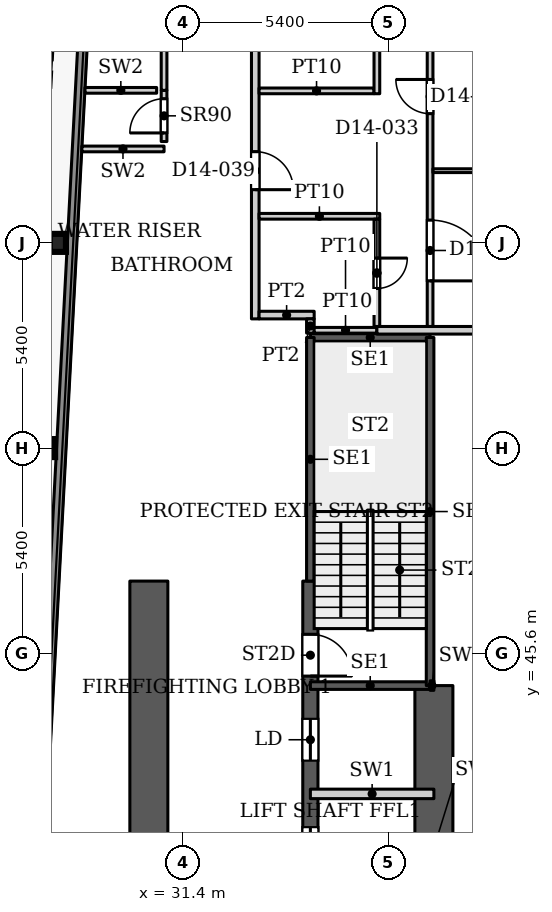
"""IFC4 building model, lengths in metres.
Left out: names, types, materials, properties, quantities, classifications, styles, units other than length and angle.
Written with IfcOpenShell. Run it as: python <this file> out.ifc"""

import sys

from ifc_helpers import new_model, si_unit, direction, frame, frame_2d, origin, origin_2d, place, context, subcontext, project, spatial, rectangle, i_section, extrude, source, transform, mapped, element, fill, save


model = new_model("IFC4")
c1 = context("Model", 3, precision=1e-05, world=origin(), true_north=direction((0.0, 1.0)))
c2 = subcontext(c1, "Body", "Model", "MODEL_VIEW")
j1 = project(units=[si_unit("LENGTHUNIT", "METRE"), si_unit("PLANEANGLEUNIT", "RADIAN")], contexts=[c1])
p1 = place(None, origin())
s1 = spatial("IfcSite", under=j1, at=p1, CompositionType="ELEMENT")
p2 = place(p1, origin())
s2 = spatial("IfcBuilding", under=s1, at=p2, CompositionType="ELEMENT")
p3 = place(p2, frame((0.0, 0.0, 61.7)))
s3 = spatial("IfcBuildingStorey", under=s2, at=p3, CompositionType="ELEMENT", Elevation=61.7)
for number, where, z_axis, x_axis in (
    (1, (27.822, 51.0, 0.0), (0.0, 0.0, 1.0), (1.0, 0.0, 0.0)),
    (2, (28.106, 56.4, 0.0), (0.0, 0.0, 1.0), (1.0, 0.0, 0.0)),
):
    element("IfcColumn", number, at=place(p3, frame(where, z_axis=z_axis, x_axis=x_axis)), inside=s3, PredefinedType="COLUMN", context=c2, shape_type="SweptSolid", body=[
        extrude(i_section(OverallWidth=0.424, OverallDepth=0.474, WebThickness=0.048, FlangeThickness=0.077, FilletRadius=0.014, at=origin_2d()), origin(), (0.0, 0.0, 1.0), 3.9),
    ])
p4 = place(p3, frame((34.75, 29.05, 0.0), z_axis=(0.0, 0.0, 1.0), x_axis=(0.0, 1.0, 0.0)))
e3 = element("IfcWall", 3, at=p4, inside=s3, PredefinedType="SHEAR", context=c2, shape_type="SweptSolid", body=[
    extrude(rectangle(XDim=18.45, YDim=0.4, at=frame_2d((9.225, 0.0))), origin(), (0.0, 0.0, 1.0), 3.9),
])
p5 = place(p4, frame((8.025, 0.0, 0.0)))
e4 = element("IfcOpeningElement", 4, at=p5, cuts=e3, PredefinedType="OPENING", context=c2, shape_type="SweptSolid", body=[
    extrude(rectangle(XDim=1.1, YDim=2.2, at=frame_2d((0.55, 1.1))), frame((0.0, 0.21, 0.0), z_axis=(0.0, -1.0, 0.0), x_axis=(1.0, 0.0, 0.0)), (0.0, 0.0, 1.0), 0.42),
])
p6 = place(p4, frame((10.875, 0.0, 0.0)))
e5 = element("IfcOpeningElement", 5, at=p6, cuts=e3, PredefinedType="OPENING", context=c2, shape_type="SweptSolid", body=[
    extrude(rectangle(XDim=1.1, YDim=2.2, at=frame_2d((0.55, 1.1))), frame((0.0, 0.21, 0.0), z_axis=(0.0, -1.0, 0.0), x_axis=(1.0, 0.0, 0.0)), (0.0, 0.0, 1.0), 0.42),
])
p7 = place(p4, frame((13.725, 0.0, 0.0)))
e6 = element("IfcOpeningElement", 6, at=p7, cuts=e3, PredefinedType="OPENING", context=c2, shape_type="SweptSolid", body=[
    extrude(rectangle(XDim=1.1, YDim=2.2, at=frame_2d((0.55, 1.1))), frame((0.0, 0.21, 0.0), z_axis=(0.0, -1.0, 0.0), x_axis=(1.0, 0.0, 0.0)), (0.0, 0.0, 1.0), 0.42),
])
p8 = place(p4, frame((15.95, 0.0, 0.0)))
e7 = element("IfcOpeningElement", 7, at=p8, cuts=e3, PredefinedType="OPENING", context=c2, shape_type="SweptSolid", body=[
    extrude(rectangle(XDim=1.1, YDim=2.2, at=frame_2d((0.55, 1.1))), frame((0.0, 0.21, 0.0), z_axis=(0.0, -1.0, 0.0), x_axis=(1.0, 0.0, 0.0)), (0.0, 0.0, 1.0), 0.42),
])
p9 = place(p3, frame((38.0, 36.2, 0.0), z_axis=(0.0, 0.0, 1.0), x_axis=(0.0, 1.0, 0.0)))
e8 = element("IfcWall", 8, at=p9, inside=s3, PredefinedType="SHEAR", context=c2, shape_type="SweptSolid", body=[
    extrude(rectangle(XDim=8.55, YDim=1.0, at=frame_2d((4.275, 0.0))), origin(), (0.0, 0.0, 1.0), 3.9),
])
p10 = place(p3, frame((30.5, 29.05, 0.0), z_axis=(0.0, 0.0, 1.0), x_axis=(0.0, 1.0, 0.0)))
e9 = element("IfcWall", 9, at=p10, inside=s3, PredefinedType="SHEAR", context=c2, shape_type="SweptSolid", body=[
    extrude(rectangle(XDim=18.45, YDim=1.0, at=frame_2d((9.225, 0.0))), origin(), (0.0, 0.0, 1.0), 3.9),
])
p11 = place(p10, frame((1.5, 0.0, 0.0)))
e10 = element("IfcOpeningElement", 10, at=p11, cuts=e9, PredefinedType="OPENING", context=c2, shape_type="SweptSolid", body=[
    extrude(rectangle(XDim=0.9, YDim=2.2, at=frame_2d((0.45, 1.1))), frame((0.0, 0.51, 0.0), z_axis=(0.0, -1.0, 0.0), x_axis=(1.0, 0.0, 0.0)), (0.0, 0.0, 1.0), 1.02),
])
p12 = place(p10, frame((6.03, 0.0, 0.0)))
e11 = element("IfcOpeningElement", 11, at=p12, cuts=e9, PredefinedType="OPENING", context=c2, shape_type="SweptSolid", body=[
    extrude(rectangle(XDim=0.9, YDim=2.2, at=frame_2d((0.45, 1.1))), frame((0.0, 0.51, 0.0), z_axis=(0.0, -1.0, 0.0), x_axis=(1.0, 0.0, 0.0)), (0.0, 0.0, 1.0), 1.02),
])
p13 = place(p10, frame((9.7, 0.0, 0.0)))
e12 = element("IfcOpeningElement", 12, at=p13, cuts=e9, PredefinedType="OPENING", context=c2, shape_type="SweptSolid", body=[
    extrude(rectangle(XDim=0.9, YDim=2.2, at=frame_2d((0.45, 1.1))), frame((0.0, 0.51, 0.0), z_axis=(0.0, -1.0, 0.0), x_axis=(1.0, 0.0, 0.0)), (0.0, 0.0, 1.0), 1.02),
])
p14 = place(p3, frame((27.195, 31.969, 0.0), z_axis=(0.0, 0.0, 1.0), x_axis=(0.052554995867, 0.998618031286, 0.0)))
e13 = element("IfcWall", 13, at=p14, inside=s3, PredefinedType="SOLIDWALL", context=c2, shape_type="SweptSolid", body=[
    extrude(rectangle(XDim=66.787, YDim=0.25, at=frame_2d((33.394, 0.0))), origin(), (0.0, 0.0, 1.0), 3.75),
])
for number, where, z_axis, x_axis in (
    (14, (34.75, 44.75, 0.0), (0.0, 0.0, 1.0), (1.0, 0.0, 0.0)),
    (15, (34.75, 53.91, 0.0), (0.0, 0.0, 1.0), (1.0, 0.0, 0.0)),
):
    element("IfcWall", number, at=place(p3, frame(where, z_axis=z_axis, x_axis=x_axis)), inside=s3, PredefinedType="SHEAR", context=c2, shape_type="SweptSolid", body=[
        extrude(rectangle(XDim=3.15, YDim=0.2, at=frame_2d((1.575, 0.0))), origin(), (0.0, 0.0, 1.0), 3.9),
    ])
p15 = place(p3, frame((34.75, 47.5, 0.0), z_axis=(0.0, 0.0, 1.0), x_axis=(0.0, 1.0, 0.0)))
e16 = element("IfcWall", 16, at=p15, inside=s3, PredefinedType="SHEAR", context=c2, shape_type="SweptSolid", body=[
    extrude(rectangle(XDim=6.41, YDim=0.2, at=frame_2d((3.205, 0.0))), origin(), (0.0, 0.0, 1.0), 3.9),
])
p16 = place(p3, frame((37.9, 44.75, 0.0), z_axis=(0.0, 0.0, 1.0), x_axis=(0.0, 1.0, 0.0)))
e17 = element("IfcWall", 17, at=p16, inside=s3, PredefinedType="SHEAR", context=c2, shape_type="SweptSolid", body=[
    extrude(rectangle(XDim=9.16, YDim=0.2, at=frame_2d((4.58, 0.0))), origin(), (0.0, 0.0, 1.0), 3.9),
])
p17 = place(p3, frame((34.75, 41.9, 0.0), z_axis=(0.0, 0.0, 1.0), x_axis=(1.0, 0.0, 0.0)))
e18 = element("IfcWall", 18, at=p17, inside=s3, PredefinedType="PARTITIONING", context=c2, shape_type="SweptSolid", body=[
    extrude(rectangle(XDim=3.25, YDim=0.25, at=frame_2d((1.625, 0.0))), origin(), (0.0, 0.0, 1.0), 3.9),
])
p18 = place(p3, frame((37.9, 44.75, 0.0), z_axis=(0.0, 0.0, 1.0), x_axis=(1.0, 0.0, 0.0)))
e19 = element("IfcWall", 19, at=p18, inside=s3, PredefinedType="PARTITIONING", context=c2, shape_type="SweptSolid", body=[
    extrude(rectangle(XDim=0.1, YDim=0.25, at=frame_2d((0.05, 0.0))), origin(), (0.0, 0.0, 1.0), 3.9),
])
p19 = place(p3, frame((28.738, 58.872, 0.0), z_axis=(0.0, 0.0, 1.0), x_axis=(1.0, 0.0, 0.0)))
e20 = element("IfcWall", 20, at=p19, inside=s3, PredefinedType="PARTITIONING", context=c2, shape_type="SweptSolid", body=[
    extrude(rectangle(XDim=2.162, YDim=0.15, at=frame_2d((1.081, 0.0))), origin(), (0.0, 0.0, 1.0), 3.9),
])
p20 = place(p3, frame((30.9, 59.067, 0.0), z_axis=(0.0, 0.0, 1.0), x_axis=(0.0, 1.0, 0.0)))
e21 = element("IfcWall", 21, at=p20, inside=s3, PredefinedType="PARTITIONING", context=c2, shape_type="SweptSolid", body=[
    extrude(rectangle(XDim=1.347, YDim=0.15, at=frame_2d((0.674, 0.0))), origin(), (0.0, 0.0, 1.0), 3.9),
])
p21 = place(p20, frame((0.226, 0.0, 0.0)))
e22 = element("IfcOpeningElement", 22, at=p21, cuts=e21, PredefinedType="OPENING", context=c2, shape_type="SweptSolid", body=[
    extrude(rectangle(XDim=0.9, YDim=2.2, at=frame_2d((0.45, 1.1))), frame((0.0, 0.085, 0.0), z_axis=(0.0, -1.0, 0.0), x_axis=(1.0, 0.0, 0.0)), (0.0, 0.0, 1.0), 0.17),
])
p22 = place(p3, frame((28.82, 60.414, 0.0), z_axis=(0.0, 0.0, 1.0), x_axis=(1.0, 0.0, 0.0)))
e23 = element("IfcWall", 23, at=p22, inside=s3, PredefinedType="PARTITIONING", context=c2, shape_type="SweptSolid", body=[
    extrude(rectangle(XDim=1.885, YDim=0.15, at=frame_2d((0.942, 0.0))), origin(), (0.0, 0.0, 1.0), 3.9),
])
p23 = place(p3, frame((30.9, 60.414, 0.0), z_axis=(0.0, 0.0, 1.0), x_axis=(0.0, 1.0, 0.0)))
e24 = element("IfcWall", 24, at=p23, inside=s3, PredefinedType="PARTITIONING", context=c2, shape_type="SweptSolid", body=[
    extrude(rectangle(XDim=4.386, YDim=0.15, at=frame_2d((2.193, 0.0))), origin(), (0.0, 0.0, 1.0), 3.072),
])
p24 = place(p23, frame((1.743, 0.0, 0.0)))
e25 = element("IfcOpeningElement", 25, at=p24, cuts=e24, PredefinedType="OPENING", context=c2, shape_type="SweptSolid", body=[
    extrude(rectangle(XDim=0.9, YDim=2.2, at=frame_2d((0.45, 1.1))), frame((0.0, 0.085, 0.0), z_axis=(0.0, -1.0, 0.0), x_axis=(1.0, 0.0, 0.0)), (0.0, 0.0, 1.0), 0.17),
])
p25 = place(p3, frame((33.3, 54.4, 0.0), z_axis=(0.0, 0.0, 1.0), x_axis=(0.0, 1.0, 0.0)))
e26 = element("IfcWall", 26, at=p25, inside=s3, PredefinedType="PARTITIONING", context=c2, shape_type="SweptSolid", body=[
    extrude(rectangle(XDim=24.95, YDim=0.2, at=frame_2d((12.475, 0.0))), origin(), (0.0, 0.0, 1.0), 3.6),
])
p26 = place(p25, frame((3.4, 0.0, 0.0)))
e27 = element("IfcOpeningElement", 27, at=p26, cuts=e26, PredefinedType="OPENING", context=c2, shape_type="SweptSolid", body=[
    extrude(rectangle(XDim=1.0, YDim=2.1, at=frame_2d((0.5, 1.05))), frame((0.0, 0.11, 0.0), z_axis=(0.0, -1.0, 0.0), x_axis=(1.0, 0.0, 0.0)), (0.0, 0.0, 1.0), 0.22),
])
p27 = place(p3, frame((33.4, 54.5, 0.0), z_axis=(0.0, 0.0, 1.0), x_axis=(1.0, 0.0, 0.0)))
e28 = element("IfcWall", 28, at=p27, inside=s3, PredefinedType="PARTITIONING", context=c2, shape_type="SweptSolid", body=[
    extrude(rectangle(XDim=1.45, YDim=0.2, at=frame_2d((0.725, 0.0))), origin(), (0.0, 0.0, 1.0), 3.6),
])
p28 = place(p3, frame((33.4, 57.1, 0.0), z_axis=(0.0, 0.0, 1.0), x_axis=(1.0, 0.0, 0.0)))
e29 = element("IfcWall", 29, at=p28, inside=s3, PredefinedType="PARTITIONING", context=c2, shape_type="SweptSolid", body=[
    extrude(rectangle(XDim=3.175, YDim=0.15, at=frame_2d((1.587, 0.0))), origin(), (0.0, 0.0, 1.0), 3.6),
])
p29 = place(p3, frame((33.4, 60.4, 0.0), z_axis=(0.0, 0.0, 1.0), x_axis=(1.0, 0.0, 0.0)))
e30 = element("IfcWall", 30, at=p29, inside=s3, PredefinedType="PARTITIONING", context=c2, shape_type="SweptSolid", body=[
    extrude(rectangle(XDim=3.025, YDim=0.15, at=frame_2d((1.513, 0.0))), origin(), (0.0, 0.0, 1.0), 3.6),
])
p30 = place(p3, frame((34.75, 54.025, 0.0), z_axis=(0.0, 0.0, 1.0), x_axis=(0.0, 1.0, 0.0)))
e31 = element("IfcWall", 31, at=p30, inside=s3, PredefinedType="PARTITIONING", context=c2, shape_type="SweptSolid", body=[
    extrude(rectangle(XDim=0.375, YDim=0.2, at=frame_2d((0.188, 0.0))), origin(), (0.0, 0.0, 1.0), 3.6),
])
p31 = place(p3, frame((34.85, 54.1, 0.0), z_axis=(0.0, 0.0, 1.0), x_axis=(1.0, 0.0, 0.0)))
e32 = element("IfcWall", 32, at=p31, inside=s3, PredefinedType="PARTITIONING", context=c2, shape_type="SweptSolid", body=[
    extrude(rectangle(XDim=1.65, YDim=0.15, at=frame_2d((0.825, 0.0))), origin(), (0.0, 0.0, 1.0), 3.6),
])
p32 = place(p3, frame((36.5, 54.1, 0.0), z_axis=(0.0, 0.0, 1.0), x_axis=(1.0, 0.0, 0.0)))
e33 = element("IfcWall", 33, at=p32, inside=s3, PredefinedType="PARTITIONING", context=c2, shape_type="SweptSolid", body=[
    extrude(rectangle(XDim=9.4, YDim=0.2, at=frame_2d((4.7, 0.0))), origin(), (0.0, 0.0, 1.0), 3.6),
])
p33 = place(p3, frame((36.5, 54.2, 0.0), z_axis=(0.0, 0.0, 1.0), x_axis=(0.0, 1.0, 0.0)))
e34 = element("IfcWall", 34, at=p33, inside=s3, PredefinedType="PARTITIONING", context=c2, shape_type="SweptSolid", body=[
    extrude(rectangle(XDim=2.825, YDim=0.15, at=frame_2d((1.413, 0.0))), origin(), (0.0, 0.0, 1.0), 3.6),
])
p34 = place(p33, frame((1.0, 0.0, 0.0)))
e35 = element("IfcOpeningElement", 35, at=p34, cuts=e34, PredefinedType="OPENING", context=c2, shape_type="SweptSolid", body=[
    extrude(rectangle(XDim=0.8, YDim=2.1, at=frame_2d((0.4, 1.05))), frame((0.0, 0.085, 0.0), z_axis=(0.0, -1.0, 0.0), x_axis=(1.0, 0.0, 0.0)), (0.0, 0.0, 1.0), 0.17),
])
p35 = place(p3, frame((36.5, 60.325, 0.0), z_axis=(0.0, 0.0, 1.0), x_axis=(0.0, 1.0, 0.0)))
e36 = element("IfcWall", 36, at=p35, inside=s3, PredefinedType="PARTITIONING", context=c2, shape_type="SweptSolid", body=[
    extrude(rectangle(XDim=18.925, YDim=0.15, at=frame_2d((9.462, 0.0))), origin(), (0.0, 0.0, 1.0), 3.6),
])
p36 = place(p35, frame((8.075, 0.0, 0.0)))
e37 = element("IfcOpeningElement", 37, at=p36, cuts=e36, PredefinedType="OPENING", context=c2, shape_type="SweptSolid", body=[
    extrude(rectangle(XDim=0.8, YDim=2.1, at=frame_2d((0.4, 1.05))), frame((0.0, 0.085, 0.0), z_axis=(0.0, -1.0, 0.0), x_axis=(1.0, 0.0, 0.0)), (0.0, 0.0, 1.0), 0.17),
])
p37 = place(p35, frame((15.425, 0.0, 0.0)))
e38 = element("IfcOpeningElement", 38, at=p37, cuts=e36, PredefinedType="OPENING", context=c2, shape_type="SweptSolid", body=[
    extrude(rectangle(XDim=0.9, YDim=2.1, at=frame_2d((0.45, 1.05))), frame((0.0, 0.085, 0.0), z_axis=(0.0, -1.0, 0.0), x_axis=(1.0, 0.0, 0.0)), (0.0, 0.0, 1.0), 0.17),
])
p38 = place(p35, frame((12.275, 0.0, 0.0)))
e39 = element("IfcOpeningElement", 39, at=p38, cuts=e36, PredefinedType="OPENING", context=c2, shape_type="SweptSolid", body=[
    extrude(rectangle(XDim=0.8, YDim=2.1, at=frame_2d((0.4, 1.05))), frame((0.0, 0.085, 0.0), z_axis=(0.0, -1.0, 0.0), x_axis=(1.0, 0.0, 0.0)), (0.0, 0.0, 1.0), 0.17),
])
p39 = place(p35, frame((1.675, 0.0, 0.0)))
e40 = element("IfcOpeningElement", 40, at=p39, cuts=e36, PredefinedType="OPENING", context=c2, shape_type="SweptSolid", body=[
    extrude(rectangle(XDim=0.8, YDim=2.1, at=frame_2d((0.4, 1.05))), frame((0.0, 0.085, 0.0), z_axis=(0.0, -1.0, 0.0), x_axis=(1.0, 0.0, 0.0)), (0.0, 0.0, 1.0), 0.17),
])
p40 = place(p3, frame((37.9, 54.2, 0.0), z_axis=(0.0, 0.0, 1.0), x_axis=(0.0, 1.0, 0.0)))
e41 = element("IfcWall", 41, at=p40, inside=s3, PredefinedType="PARTITIONING", context=c2, shape_type="SweptSolid", body=[
    extrude(rectangle(XDim=25.05, YDim=0.15, at=frame_2d((12.525, 0.0))), origin(), (0.0, 0.0, 1.0), 3.6),
])
p41 = place(p40, frame((5.6, 0.0, 0.0)))
e42 = element("IfcOpeningElement", 42, at=p41, cuts=e41, PredefinedType="OPENING", context=c2, shape_type="SweptSolid", body=[
    extrude(rectangle(XDim=0.9, YDim=2.1, at=frame_2d((0.45, 1.05))), frame((0.0, 0.085, 0.0), z_axis=(0.0, -1.0, 0.0), x_axis=(1.0, 0.0, 0.0)), (0.0, 0.0, 1.0), 0.17),
])
p42 = place(p40, frame((14.9, 0.0, 0.0)))
e43 = element("IfcOpeningElement", 43, at=p42, cuts=e41, PredefinedType="OPENING", context=c2, shape_type="SweptSolid", body=[
    extrude(rectangle(XDim=0.9, YDim=2.1, at=frame_2d((0.45, 1.05))), frame((0.0, 0.085, 0.0), z_axis=(0.0, -1.0, 0.0), x_axis=(1.0, 0.0, 0.0)), (0.0, 0.0, 1.0), 0.17),
])
p43 = place(p40, frame((18.65, 0.0, 0.0)))
e44 = element("IfcOpeningElement", 44, at=p43, cuts=e41, PredefinedType="OPENING", context=c2, shape_type="SweptSolid", body=[
    extrude(rectangle(XDim=0.9, YDim=2.1, at=frame_2d((0.45, 1.05))), frame((0.0, 0.085, 0.0), z_axis=(0.0, -1.0, 0.0), x_axis=(1.0, 0.0, 0.0)), (0.0, 0.0, 1.0), 0.17),
])
p44 = place(p40, frame((22.5, 0.0, 0.0)))
e45 = element("IfcOpeningElement", 45, at=p44, cuts=e41, PredefinedType="OPENING", context=c2, shape_type="SweptSolid", body=[
    extrude(rectangle(XDim=1.0, YDim=2.1, at=frame_2d((0.5, 1.05))), frame((0.0, 0.085, 0.0), z_axis=(0.0, -1.0, 0.0), x_axis=(1.0, 0.0, 0.0)), (0.0, 0.0, 1.0), 0.17),
])
p45 = place(p40, frame((1.2, 0.0, 0.0)))
e46 = element("IfcOpeningElement", 46, at=p45, cuts=e41, PredefinedType="OPENING", context=c2, shape_type="SweptSolid", body=[
    extrude(rectangle(XDim=1.6, YDim=2.1, at=frame_2d((0.8, 1.05))), frame((0.0, 0.085, 0.0), z_axis=(0.0, -1.0, 0.0), x_axis=(1.0, 0.0, 0.0)), (0.0, 0.0, 1.0), 0.17),
])
p46 = place(p40, frame((11.3, 0.0, 0.0)))
e47 = element("IfcOpeningElement", 47, at=p46, cuts=e41, PredefinedType="OPENING", context=c2, shape_type="SweptSolid", body=[
    extrude(rectangle(XDim=0.9, YDim=2.1, at=frame_2d((0.45, 1.05))), frame((0.0, 0.085, 0.0), z_axis=(0.0, -1.0, 0.0), x_axis=(1.0, 0.0, 0.0)), (0.0, 0.0, 1.0), 0.17),
])
p47 = place(p3, frame((37.975, 58.3, 0.0), z_axis=(0.0, 0.0, 1.0), x_axis=(1.0, 0.0, 0.0)))
e48 = element("IfcWall", 48, at=p47, inside=s3, PredefinedType="PARTITIONING", context=c2, shape_type="SweptSolid", body=[
    extrude(rectangle(XDim=7.925, YDim=0.1, at=frame_2d((3.962, 0.0))), origin(), (0.0, 0.0, 1.0), 3.6),
])
m1 = source(origin(), c2, "Body", "SweptSolid", [
    extrude(rectangle(XDim=1.1, YDim=2.2, at=frame_2d((0.55, 1.1))), frame((0.0, 0.025, 0.0), z_axis=(0.0, -1.0, 0.0), x_axis=(1.0, 0.0, 0.0)), (0.0, 0.0, 1.0), 0.05),
])
p48 = place(p6, origin())
e49 = element("IfcDoor", 49, at=p48, inside=s3, OperationType="SLIDING_TO_LEFT", PredefinedType="DOOR", context=c2, shape_type="MappedRepresentation", body=[
    mapped(m1, transform((0.0, 0.0, 0.0), x_axis=(1.0, 0.0, 0.0), y_axis=(0.0, 1.0, 0.0), z_axis=(0.0, 0.0, 1.0), scale=1.0)),
])
fill(e5, e49)
p49 = place(p7, origin())
e50 = element("IfcDoor", 50, at=p49, inside=s3, OperationType="SLIDING_TO_LEFT", PredefinedType="DOOR", context=c2, shape_type="MappedRepresentation", body=[
    mapped(m1, transform((0.0, 0.0, 0.0), x_axis=(1.0, 0.0, 0.0), y_axis=(0.0, 1.0, 0.0), z_axis=(0.0, 0.0, 1.0), scale=1.0)),
])
fill(e6, e50)
m2 = source(origin(), c2, "Body", "SweptSolid", [
    extrude(rectangle(XDim=0.9, YDim=2.2, at=frame_2d((0.45, 1.1))), frame((0.0, 0.025, 0.0), z_axis=(0.0, -1.0, 0.0), x_axis=(1.0, 0.0, 0.0)), (0.0, 0.0, 1.0), 0.05),
])
p50 = place(p21, origin())
e51 = element("IfcDoor", 51, at=p50, inside=s3, OperationType="SINGLE_SWING_LEFT", PredefinedType="DOOR", context=c2, shape_type="MappedRepresentation", body=[
    mapped(m2, transform((0.0, 0.0, 0.0), x_axis=(1.0, 0.0, 0.0), y_axis=(0.0, 1.0, 0.0), z_axis=(0.0, 0.0, 1.0), scale=1.0)),
])
fill(e22, e51)
m3 = source(origin(), c2, "Body", "SweptSolid", [
    extrude(rectangle(XDim=1.1, YDim=2.2, at=frame_2d((0.55, 1.1))), frame((0.0, 0.025, 0.0), z_axis=(0.0, -1.0, 0.0), x_axis=(1.0, 0.0, 0.0)), (0.0, 0.0, 1.0), 0.05),
])
p51 = place(p8, origin())
e52 = element("IfcDoor", 52, at=p51, inside=s3, OperationType="SINGLE_SWING_RIGHT", PredefinedType="DOOR", context=c2, shape_type="MappedRepresentation", body=[
    mapped(m3, transform((0.0, 0.0, 0.0), x_axis=(1.0, 0.0, 0.0), y_axis=(0.0, 1.0, 0.0), z_axis=(0.0, 0.0, 1.0), scale=1.0)),
])
fill(e7, e52)
m4 = source(origin(), c2, "Body", "SweptSolid", [
    extrude(rectangle(XDim=0.8, YDim=2.1, at=frame_2d((0.4, 1.05))), frame((0.0, 0.025, 0.0), z_axis=(0.0, -1.0, 0.0), x_axis=(1.0, 0.0, 0.0)), (0.0, 0.0, 1.0), 0.05),
])
p52 = place(p34, origin())
e53 = element("IfcDoor", 53, at=p52, inside=s3, OperationType="SINGLE_SWING_RIGHT", PredefinedType="DOOR", context=c2, shape_type="MappedRepresentation", body=[
    mapped(m4, transform((0.0, 0.0, 0.0), x_axis=(1.0, 0.0, 0.0), y_axis=(0.0, 1.0, 0.0), z_axis=(0.0, 0.0, 1.0), scale=1.0)),
])
fill(e35, e53)
m5 = source(origin(), c2, "Body", "SweptSolid", [
    extrude(rectangle(XDim=0.9, YDim=2.1, at=frame_2d((0.45, 1.05))), frame((0.0, 0.025, 0.0), z_axis=(0.0, -1.0, 0.0), x_axis=(1.0, 0.0, 0.0)), (0.0, 0.0, 1.0), 0.05),
])
p53 = place(p41, origin())
e54 = element("IfcDoor", 54, at=p53, inside=s3, OperationType="SINGLE_SWING_LEFT", PredefinedType="DOOR", context=c2, shape_type="MappedRepresentation", body=[
    mapped(m5, transform((0.0, 0.0, 0.0), x_axis=(1.0, 0.0, 0.0), y_axis=(0.0, 1.0, 0.0), z_axis=(0.0, 0.0, 1.0), scale=1.0)),
])
fill(e42, e54)
m6 = source(origin(), c2, "Body", "SweptSolid", [
    extrude(rectangle(XDim=1.0, YDim=2.1, at=frame_2d((0.5, 1.05))), frame((0.0, 0.025, 0.0), z_axis=(0.0, -1.0, 0.0), x_axis=(1.0, 0.0, 0.0)), (0.0, 0.0, 1.0), 0.05),
])
p54 = place(p26, origin())
e55 = element("IfcDoor", 55, at=p54, inside=s3, OperationType="SINGLE_SWING_RIGHT", PredefinedType="DOOR", context=c2, shape_type="MappedRepresentation", body=[
    mapped(m6, transform((0.0, 0.0, 0.0), x_axis=(1.0, 0.0, 0.0), y_axis=(0.0, 1.0, 0.0), z_axis=(0.0, 0.0, 1.0), scale=1.0)),
])
fill(e27, e55)
m7 = source(origin(), c2, "Body", "SweptSolid", [
    extrude(rectangle(XDim=1.6, YDim=2.1, at=frame_2d((0.8, 1.05))), frame((0.0, 0.025, 0.0), z_axis=(0.0, -1.0, 0.0), x_axis=(1.0, 0.0, 0.0)), (0.0, 0.0, 1.0), 0.05),
])
p55 = place(p45, origin())
e56 = element("IfcDoor", 56, at=p55, inside=s3, OperationType="DOUBLE_DOOR_SINGLE_SWING", PredefinedType="DOOR", context=c2, shape_type="MappedRepresentation", body=[
    mapped(m7, transform((0.0, 0.0, 0.0), x_axis=(1.0, 0.0, 0.0), y_axis=(0.0, 1.0, 0.0), z_axis=(0.0, 0.0, 1.0), scale=1.0)),
])
fill(e46, e56)
save(model, sys.argv[1])
